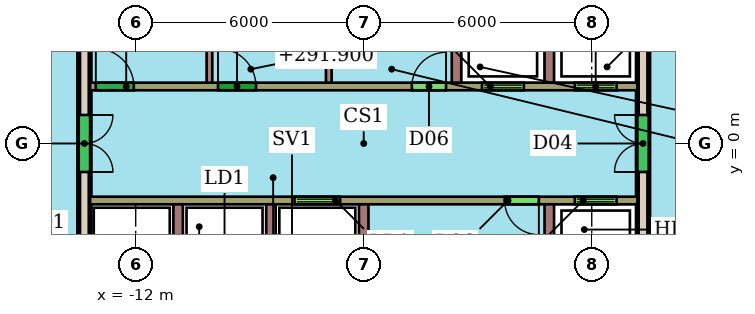
"""IFC4 building model, lengths in metres.
Left out: names, types, materials, properties, quantities, classifications, styles, units other than length and angle.
Written with IfcOpenShell. Run it as: python <this file> out.ifc"""

import sys

from ifc_helpers import new_model, si_unit, direction, frame, frame_2d, origin, place, context, subcontext, project, spatial, rectangle, extrude, element, fill, save


model = new_model("IFC4")
c1 = context("Model", 3, precision=1e-05, world=origin(), true_north=direction((0.0, 1.0)))
c2 = subcontext(c1, "Body", "Model", "MODEL_VIEW")
j1 = project(units=[si_unit("LENGTHUNIT", "METRE"), si_unit("PLANEANGLEUNIT", "RADIAN")], contexts=[c1])
p1 = place(None, origin())
s1 = spatial("IfcSite", under=j1, at=p1, CompositionType="ELEMENT")
p2 = place(p1, origin())
s2 = spatial("IfcBuilding", under=s1, at=p2, CompositionType="ELEMENT")
p3 = place(p2, frame((0.0, 0.0, 290.1)))
s3 = spatial("IfcBuildingStorey", under=s2, at=p3, CompositionType="ELEMENT", Elevation=290.1)
p4 = place(p3, frame((-13.35, 7.3, 0.0), z_axis=(0.0, 0.0, 1.0), x_axis=(0.0, -1.0, 0.0)))
e1 = element("IfcWall", 1, at=p4, inside=s3, PredefinedType="SHEAR", context=c2, shape_type="SweptSolid", body=[
    extrude(rectangle(XDim=14.6, YDim=0.3, at=frame_2d((7.3, 0.0))), origin(), (0.0, 0.0, 1.0), 3.3),
])
p5 = place(p4, frame((6.55, 0.0, 0.0)))
e2 = element("IfcOpeningElement", 2, at=p5, cuts=e1, PredefinedType="OPENING", context=c2, shape_type="SweptSolid", body=[
    extrude(rectangle(XDim=1.5, YDim=2.1, at=frame_2d((0.75, 1.05))), frame((0.0, 0.16, 0.0), z_axis=(0.0, -1.0, 0.0), x_axis=(1.0, 0.0, 0.0)), (0.0, 0.0, 1.0), 0.32),
])
p6 = place(p3, frame((1.35, -7.3, 0.0), z_axis=(0.0, 0.0, 1.0), x_axis=(0.0, 1.0, 0.0)))
e3 = element("IfcWall", 3, at=p6, inside=s3, PredefinedType="SHEAR", context=c2, shape_type="SweptSolid", body=[
    extrude(rectangle(XDim=14.6, YDim=0.3, at=frame_2d((7.3, 0.0))), origin(), (0.0, 0.0, 1.0), 3.3),
])
p7 = place(p6, frame((1.21, 0.0, 0.0)))
e4 = element("IfcOpeningElement", 4, at=p7, cuts=e3, PredefinedType="OPENING", context=c2, shape_type="SweptSolid", body=[
    extrude(rectangle(XDim=1.0, YDim=2.1, at=frame_2d((0.5, 1.05))), frame((0.0, 0.16, 0.0), z_axis=(0.0, -1.0, 0.0), x_axis=(1.0, 0.0, 0.0)), (0.0, 0.0, 1.0), 0.32),
])
p8 = place(p6, frame((6.55, 0.0, 0.0)))
e5 = element("IfcOpeningElement", 5, at=p8, cuts=e3, PredefinedType="OPENING", context=c2, shape_type="SweptSolid", body=[
    extrude(rectangle(XDim=1.5, YDim=2.1, at=frame_2d((0.75, 1.05))), frame((0.0, 0.16, 0.0), z_axis=(0.0, -1.0, 0.0), x_axis=(1.0, 0.0, 0.0)), (0.0, 0.0, 1.0), 0.32),
])
p9 = place(p3, frame((-13.2, 1.5, 0.0), z_axis=(0.0, 0.0, 1.0), x_axis=(1.0, 0.0, 0.0)))
e6 = element("IfcWall", 6, at=p9, inside=s3, PredefinedType="SHEAR", context=c2, shape_type="SweptSolid", body=[
    extrude(rectangle(XDim=14.4, YDim=0.2, at=frame_2d((7.2, 0.0))), origin(), (0.0, 0.0, 1.0), 3.3),
])
p10 = place(p9, frame((10.312, 0.0, 0.0)))
e7 = element("IfcOpeningElement", 7, at=p10, cuts=e6, PredefinedType="OPENING", context=c2, shape_type="SweptSolid", body=[
    extrude(rectangle(XDim=1.1, YDim=2.1, at=frame_2d((0.55, 1.05))), frame((0.0, 0.11, 0.0), z_axis=(0.0, -1.0, 0.0), x_axis=(1.0, 0.0, 0.0)), (0.0, 0.0, 1.0), 0.22),
])
p11 = place(p9, frame((12.754, 0.0, 0.0)))
e8 = element("IfcOpeningElement", 8, at=p11, cuts=e6, PredefinedType="OPENING", context=c2, shape_type="SweptSolid", body=[
    extrude(rectangle(XDim=1.1, YDim=2.1, at=frame_2d((0.55, 1.05))), frame((0.0, 0.11, 0.0), z_axis=(0.0, -1.0, 0.0), x_axis=(1.0, 0.0, 0.0)), (0.0, 0.0, 1.0), 0.22),
])
p12 = place(p9, frame((0.15, 0.0, 0.0)))
e9 = element("IfcOpeningElement", 9, at=p12, cuts=e6, PredefinedType="OPENING", context=c2, shape_type="SweptSolid", body=[
    extrude(rectangle(XDim=1.0, YDim=2.1, at=frame_2d((0.5, 1.05))), frame((0.0, 0.11, 0.0), z_axis=(0.0, -1.0, 0.0), x_axis=(1.0, 0.0, 0.0)), (0.0, 0.0, 1.0), 0.22),
])
p13 = place(p9, frame((3.365, 0.0, 0.0)))
e10 = element("IfcOpeningElement", 10, at=p13, cuts=e6, PredefinedType="OPENING", context=c2, shape_type="SweptSolid", body=[
    extrude(rectangle(XDim=1.0, YDim=2.1, at=frame_2d((0.5, 1.05))), frame((0.0, 0.11, 0.0), z_axis=(0.0, -1.0, 0.0), x_axis=(1.0, 0.0, 0.0)), (0.0, 0.0, 1.0), 0.22),
])
p14 = place(p9, frame((8.467, 0.0, 0.0)))
e11 = element("IfcOpeningElement", 11, at=p14, cuts=e6, PredefinedType="OPENING", context=c2, shape_type="SweptSolid", body=[
    extrude(rectangle(XDim=0.9, YDim=2.1, at=frame_2d((0.45, 1.05))), frame((0.0, 0.11, 0.0), z_axis=(0.0, -1.0, 0.0), x_axis=(1.0, 0.0, 0.0)), (0.0, 0.0, 1.0), 0.22),
])
p15 = place(p3, frame((1.2, -1.5, 0.0), z_axis=(0.0, 0.0, 1.0), x_axis=(-1.0, 0.0, 0.0)))
e12 = element("IfcWall", 12, at=p15, inside=s3, PredefinedType="SHEAR", context=c2, shape_type="SweptSolid", body=[
    extrude(rectangle(XDim=14.4, YDim=0.2, at=frame_2d((7.2, 0.0))), origin(), (0.0, 0.0, 1.0), 3.3),
])
p16 = place(p15, frame((7.821, 0.0, 0.0)))
e13 = element("IfcOpeningElement", 13, at=p16, cuts=e12, PredefinedType="OPENING", context=c2, shape_type="SweptSolid", body=[
    extrude(rectangle(XDim=1.2, YDim=2.1, at=frame_2d((0.6, 1.05))), frame((0.0, 0.11, 0.0), z_axis=(0.0, -1.0, 0.0), x_axis=(1.0, 0.0, 0.0)), (0.0, 0.0, 1.0), 0.22),
])
p17 = place(p15, frame((0.546, 0.0, 0.0)))
e14 = element("IfcOpeningElement", 14, at=p17, cuts=e12, PredefinedType="OPENING", context=c2, shape_type="SweptSolid", body=[
    extrude(rectangle(XDim=1.1, YDim=2.1, at=frame_2d((0.55, 1.05))), frame((0.0, 0.11, 0.0), z_axis=(0.0, -1.0, 0.0), x_axis=(1.0, 0.0, 0.0)), (0.0, 0.0, 1.0), 0.22),
])
p18 = place(p15, frame((2.592, 0.0, 0.0)))
e15 = element("IfcOpeningElement", 15, at=p18, cuts=e12, PredefinedType="OPENING", context=c2, shape_type="SweptSolid", body=[
    extrude(rectangle(XDim=0.9, YDim=2.1, at=frame_2d((0.45, 1.05))), frame((0.0, 0.11, 0.0), z_axis=(0.0, -1.0, 0.0), x_axis=(1.0, 0.0, 0.0)), (0.0, 0.0, 1.0), 0.22),
])
for number, where, z_axis, x_axis in (
    (16, (-3.558, 1.6, 0.0), (0.0, 0.0, 1.0), (0.0, 1.0, 0.0)),
    (17, (-1.117, 1.6, 0.0), (0.0, 0.0, 1.0), (0.0, 1.0, 0.0)),
):
    element("IfcWall", number, at=place(p3, frame(where, z_axis=z_axis, x_axis=x_axis)), inside=s3, PredefinedType="SHEAR", context=c2, shape_type="SweptSolid", body=[
        extrude(rectangle(XDim=1.93, YDim=0.25, at=frame_2d((0.965, 0.0))), origin(), (0.0, 0.0, 1.0), 3.3),
    ])
for number, where, z_axis, x_axis in (
    (18, (-10.06, 1.6, 0.0), (0.0, 0.0, 1.0), (0.0, 1.0, 0.0)),
    (19, (-6.919, 1.6, 0.0), (0.0, 0.0, 1.0), (0.0, 1.0, 0.0)),
):
    element("IfcWall", number, at=place(p3, frame(where, z_axis=z_axis, x_axis=x_axis)), inside=s3, PredefinedType="PARTITIONING", context=c2, shape_type="SweptSolid", body=[
        extrude(rectangle(XDim=1.93, YDim=0.15, at=frame_2d((0.965, 0.0))), origin(), (0.0, 0.0, 1.0), 3.3),
    ])
for number, where, z_axis, x_axis in (
    (20, (-10.883, -1.6, 0.0), (0.0, 0.0, 1.0), (0.0, -1.0, 0.0)),
    (21, (-8.442, -1.6, 0.0), (0.0, 0.0, 1.0), (0.0, -1.0, 0.0)),
    (22, (-6.0, -1.6, 0.0), (0.0, 0.0, 1.0), (0.0, -1.0, 0.0)),
    (23, (-1.117, -1.6, 0.0), (0.0, 0.0, 1.0), (0.0, -1.0, 0.0)),
):
    element("IfcWall", number, at=place(p3, frame(where, z_axis=z_axis, x_axis=x_axis)), inside=s3, PredefinedType="SHEAR", context=c2, shape_type="SweptSolid", body=[
        extrude(rectangle(XDim=1.93, YDim=0.25, at=frame_2d((0.965, 0.0))), origin(), (0.0, 0.0, 1.0), 3.3),
    ])
p19 = place(p5, origin())
e24 = element("IfcDoor", 24, at=p19, inside=s3, OperationType="DOUBLE_DOOR_SINGLE_SWING", PredefinedType="NOTDEFINED", context=c2, shape_type="SweptSolid", body=[
    extrude(rectangle(XDim=1.5, YDim=2.1, at=frame_2d((0.75, 1.05))), frame((0.0, 0.025, 0.0), z_axis=(0.0, -1.0, 0.0), x_axis=(1.0, 0.0, 0.0)), (0.0, 0.0, 1.0), 0.05),
])
fill(e2, e24)
p20 = place(p8, origin())
e25 = element("IfcDoor", 25, at=p20, inside=s3, OperationType="DOUBLE_DOOR_SINGLE_SWING", PredefinedType="NOTDEFINED", context=c2, shape_type="SweptSolid", body=[
    extrude(rectangle(XDim=1.5, YDim=2.1, at=frame_2d((0.75, 1.05))), frame((0.0, 0.025, 0.0), z_axis=(0.0, -1.0, 0.0), x_axis=(1.0, 0.0, 0.0)), (0.0, 0.0, 1.0), 0.05),
])
fill(e5, e25)
p21 = place(p10, origin())
e26 = element("IfcDoor", 26, at=p21, inside=s3, OperationType="DOUBLE_DOOR_SLIDING", PredefinedType="NOTDEFINED", context=c2, shape_type="SweptSolid", body=[
    extrude(rectangle(XDim=1.1, YDim=2.1, at=frame_2d((0.55, 1.05))), frame((0.0, 0.025, 0.0), z_axis=(0.0, -1.0, 0.0), x_axis=(1.0, 0.0, 0.0)), (0.0, 0.0, 1.0), 0.05),
])
fill(e7, e26)
p22 = place(p11, origin())
e27 = element("IfcDoor", 27, at=p22, inside=s3, OperationType="DOUBLE_DOOR_SLIDING", PredefinedType="NOTDEFINED", context=c2, shape_type="SweptSolid", body=[
    extrude(rectangle(XDim=1.1, YDim=2.1, at=frame_2d((0.55, 1.05))), frame((0.0, 0.025, 0.0), z_axis=(0.0, -1.0, 0.0), x_axis=(1.0, 0.0, 0.0)), (0.0, 0.0, 1.0), 0.05),
])
fill(e8, e27)
p23 = place(p12, origin())
e28 = element("IfcDoor", 28, at=p23, inside=s3, OperationType="SINGLE_SWING_LEFT", PredefinedType="NOTDEFINED", context=c2, shape_type="SweptSolid", body=[
    extrude(rectangle(XDim=1.0, YDim=2.1, at=frame_2d((0.5, 1.05))), frame((0.0, 0.025, 0.0), z_axis=(0.0, -1.0, 0.0), x_axis=(1.0, 0.0, 0.0)), (0.0, 0.0, 1.0), 0.05),
])
fill(e9, e28)
p24 = place(p13, origin())
e29 = element("IfcDoor", 29, at=p24, inside=s3, OperationType="SINGLE_SWING_LEFT", PredefinedType="NOTDEFINED", context=c2, shape_type="SweptSolid", body=[
    extrude(rectangle(XDim=1.0, YDim=2.1, at=frame_2d((0.5, 1.05))), frame((0.0, 0.025, 0.0), z_axis=(0.0, -1.0, 0.0), x_axis=(1.0, 0.0, 0.0)), (0.0, 0.0, 1.0), 0.05),
])
fill(e10, e29)
p25 = place(p14, origin())
e30 = element("IfcDoor", 30, at=p25, inside=s3, OperationType="SINGLE_SWING_RIGHT", PredefinedType="NOTDEFINED", context=c2, shape_type="SweptSolid", body=[
    extrude(rectangle(XDim=0.9, YDim=2.1, at=frame_2d((0.45, 1.05))), frame((0.0, 0.025, 0.0), z_axis=(0.0, -1.0, 0.0), x_axis=(1.0, 0.0, 0.0)), (0.0, 0.0, 1.0), 0.05),
])
fill(e11, e30)
p26 = place(p16, origin())
e31 = element("IfcDoor", 31, at=p26, inside=s3, OperationType="DOUBLE_DOOR_SLIDING", PredefinedType="NOTDEFINED", context=c2, shape_type="SweptSolid", body=[
    extrude(rectangle(XDim=1.2, YDim=2.1, at=frame_2d((0.6, 1.05))), frame((0.0, 0.025, 0.0), z_axis=(0.0, -1.0, 0.0), x_axis=(1.0, 0.0, 0.0)), (0.0, 0.0, 1.0), 0.05),
])
fill(e13, e31)
p27 = place(p17, origin())
e32 = element("IfcDoor", 32, at=p27, inside=s3, OperationType="DOUBLE_DOOR_SLIDING", PredefinedType="NOTDEFINED", context=c2, shape_type="SweptSolid", body=[
    extrude(rectangle(XDim=1.1, YDim=2.1, at=frame_2d((0.55, 1.05))), frame((0.0, 0.025, 0.0), z_axis=(0.0, -1.0, 0.0), x_axis=(1.0, 0.0, 0.0)), (0.0, 0.0, 1.0), 0.05),
])
fill(e14, e32)
p28 = place(p18, origin())
e33 = element("IfcDoor", 33, at=p28, inside=s3, OperationType="SINGLE_SWING_LEFT", PredefinedType="NOTDEFINED", context=c2, shape_type="SweptSolid", body=[
    extrude(rectangle(XDim=0.9, YDim=2.1, at=frame_2d((0.45, 1.05))), frame((0.0, 0.025, 0.0), z_axis=(0.0, -1.0, 0.0), x_axis=(1.0, 0.0, 0.0)), (0.0, 0.0, 1.0), 0.05),
])
fill(e15, e33)
save(model, sys.argv[1])
